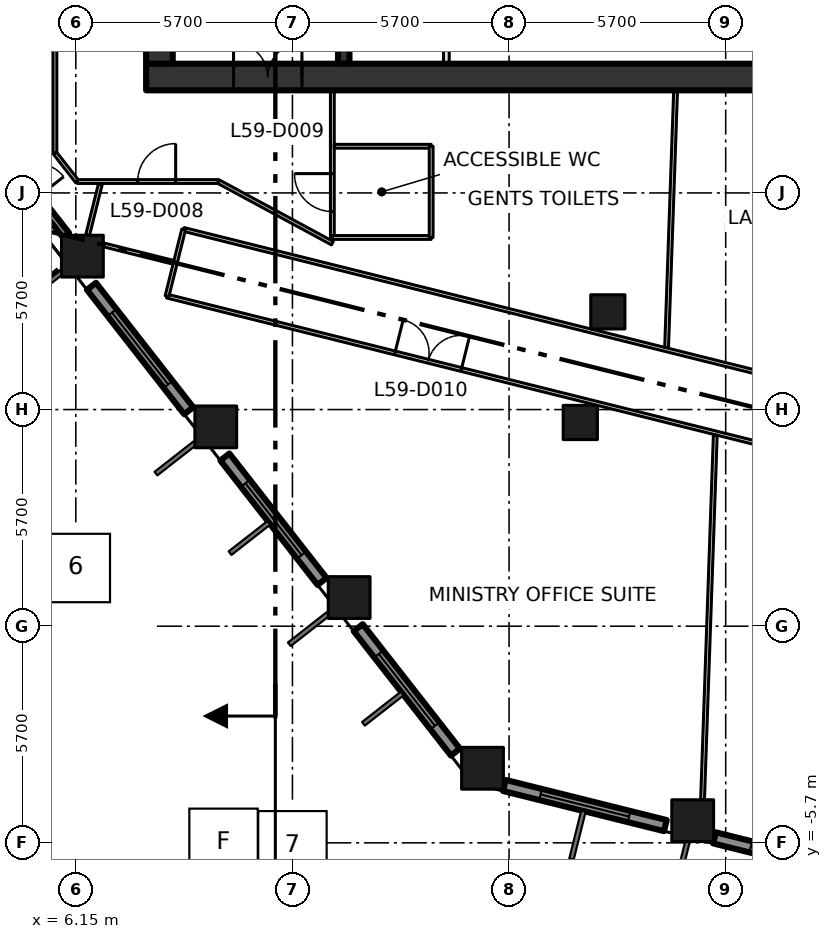
"""IFC4 building model, lengths in metres.
Left out: names, types, materials, properties, quantities, classifications, styles, units other than length and angle.
Written with IfcOpenShell. Run it as: python <this file> out.ifc"""

import sys

from ifc_helpers import new_model, si_unit, direction, frame, frame_2d, origin, origin_2d, place, context, subcontext, project, spatial, rectangle, extrude, element, fill, save


model = new_model("IFC4")
c1 = context("Model", 3, precision=1e-05, world=origin(), true_north=direction((0.0, 1.0)))
c2 = subcontext(c1, "Body", "Model", "MODEL_VIEW")
j1 = project(units=[si_unit("LENGTHUNIT", "METRE"), si_unit("PLANEANGLEUNIT", "RADIAN")], contexts=[c1])
p1 = place(None, origin())
s1 = spatial("IfcSite", under=j1, at=p1, CompositionType="ELEMENT")
p2 = place(p1, origin())
s2 = spatial("IfcBuilding", under=s1, at=p2, CompositionType="ELEMENT")
p3 = place(p2, frame((0.0, 0.0, 259.2)))
s3 = spatial("IfcBuildingStorey", under=s2, at=p3, CompositionType="ELEMENT", Elevation=259.2)
for number, where, z_axis, x_axis in (
    (1, (16.851, -3.738, 0.0), (0.0, 0.0, 1.0), (1.0, 0.0, 0.0)),
    (2, (13.342, 0.754, 0.0), (0.0, 0.0, 1.0), (1.0, 0.0, 0.0)),
    (3, (9.833, 5.245, 0.0), (0.0, 0.0, 1.0), (1.0, 0.0, 0.0)),
    (4, (6.323, 9.737, 0.0), (0.0, 0.0, 1.0), (1.0, 0.0, 0.0)),
    (5, (22.382, -5.117, 0.0), (0.0, 0.0, 1.0), (1.0, 0.0, 0.0)),
):
    element("IfcColumn", number, at=place(p3, frame(where, z_axis=z_axis, x_axis=x_axis)), inside=s3, PredefinedType="COLUMN", context=c2, shape_type="SweptSolid", body=[
        extrude(rectangle(XDim=1.1, YDim=1.1, at=origin_2d()), origin(), (0.0, 0.0, 1.0), 4.2),
    ])
for number, where, z_axis, x_axis in (
    (6, (19.424, 5.36, 0.0), (0.0, 0.0, 1.0), (1.0, 0.0, 0.0)),
    (7, (20.149, 8.271, 0.0), (0.0, 0.0, 1.0), (1.0, 0.0, 0.0)),
):
    element("IfcColumn", number, at=place(p3, frame(where, z_axis=z_axis, x_axis=x_axis)), inside=s3, PredefinedType="COLUMN", context=c2, shape_type="SweptSolid", body=[
        extrude(rectangle(XDim=0.9, YDim=0.9, at=origin_2d()), origin(), (0.0, 0.0, 1.0), 4.2),
    ])
p4 = place(p3, frame((8.0, 14.45, -0.3), z_axis=(0.0, 0.0, 1.0), x_axis=(1.0, 0.0, 0.0)))
e8 = element("IfcWall", 8, at=p4, inside=s3, PredefinedType="SHEAR", context=c2, shape_type="SweptSolid", body=[
    extrude(rectangle(XDim=22.8, YDim=0.7, at=frame_2d((11.4, 0.0))), origin(), (0.0, 0.0, 1.0), 4.2),
])
p5 = place(p4, frame((2.3, 0.0, 0.3)))
e9 = element("IfcOpeningElement", 9, at=p5, cuts=e8, PredefinedType="OPENING", context=c2, shape_type="SweptSolid", body=[
    extrude(rectangle(XDim=1.8, YDim=2.1, at=frame_2d((0.9, 1.05))), frame((0.0, 0.36, 0.0), z_axis=(0.0, -1.0, 0.0), x_axis=(1.0, 0.0, 0.0)), (0.0, 0.0, 1.0), 0.72),
])
p6 = place(p3, frame((8.35, 14.8, -0.3), z_axis=(0.0, 0.0, 1.0), x_axis=(0.0, 1.0, 0.0)))
e10 = element("IfcWall", 10, at=p6, inside=s3, PredefinedType="SHEAR", context=c2, shape_type="SweptSolid", body=[
    extrude(rectangle(XDim=20.9, YDim=0.7, at=frame_2d((10.45, 0.0))), origin(), (0.0, 0.0, 1.0), 4.2),
])
p7 = place(p3, frame((13.2, 14.8, 0.0), z_axis=(0.0, 0.0, 1.0), x_axis=(0.0, 1.0, 0.0)))
e11 = element("IfcWall", 11, at=p7, inside=s3, PredefinedType="SHEAR", context=c2, shape_type="SweptSolid", body=[
    extrude(rectangle(XDim=20.9, YDim=0.3, at=frame_2d((10.45, 0.0))), origin(), (0.0, 0.0, 1.0), 3.9),
])
p8 = place(p7, frame((3.5, 0.0, 0.0)))
e12 = element("IfcOpeningElement", 12, at=p8, cuts=e11, PredefinedType="OPENING", context=c2, shape_type="SweptSolid", body=[
    extrude(rectangle(XDim=1.8, YDim=2.1, at=frame_2d((0.9, 1.05))), frame((0.0, 0.16, 0.0), z_axis=(0.0, -1.0, 0.0), x_axis=(1.0, 0.0, 0.0)), (0.0, 0.0, 1.0), 0.32),
])
p9 = place(p7, frame((11.6, 0.0, 0.0)))
e13 = element("IfcOpeningElement", 13, at=p9, cuts=e11, PredefinedType="OPENING", context=c2, shape_type="SweptSolid", body=[
    extrude(rectangle(XDim=1.2, YDim=2.1, at=frame_2d((0.6, 1.05))), frame((0.0, 0.16, 0.0), z_axis=(0.0, -1.0, 0.0), x_axis=(1.0, 0.0, 0.0)), (0.0, 0.0, 1.0), 0.32),
])
p10 = place(p3, frame((15.9, 14.8, 0.0), z_axis=(0.0, 0.0, 1.0), x_axis=(0.0, 1.0, 0.0)))
e14 = element("IfcWall", 14, at=p10, inside=s3, PredefinedType="PARTITIONING", context=c2, shape_type="SweptSolid", body=[
    extrude(rectangle(XDim=2.825, YDim=0.15, at=frame_2d((1.413, 0.0))), origin(), (0.0, 0.0, 1.0), 3.9),
])
p11 = place(p3, frame((3.244, 13.679, 0.0), z_axis=(0.0, 0.0, 1.0), x_axis=(0.615682564618, -0.787994276392, 0.0)))
e15 = element("IfcWall", 15, at=p11, inside=s3, PredefinedType="SOLIDWALL", context=c2, shape_type="SweptSolid", body=[
    extrude(rectangle(XDim=4.304, YDim=0.2, at=frame_2d((2.152, 0.0))), origin(), (0.0, 0.0, 1.0), 3.15),
])
p12 = place(p11, frame((1.252, 0.0, 0.0)))
e16 = element("IfcOpeningElement", 16, at=p12, cuts=e15, PredefinedType="OPENING", context=c2, shape_type="SweptSolid", body=[
    extrude(rectangle(XDim=1.8, YDim=2.9, at=frame_2d((0.9, 1.45))), frame((0.0, 0.11, 0.0), z_axis=(0.0, -1.0, 0.0), x_axis=(1.0, 0.0, 0.0)), (0.0, 0.0, 1.0), 0.22),
])
p13 = place(p3, frame((6.562, 8.944, 0.0), z_axis=(0.0, 0.0, 1.0), x_axis=(0.615699893917, -0.787980736205, 0.0)))
e17 = element("IfcWall", 17, at=p13, inside=s3, PredefinedType="SOLIDWALL", context=c2, shape_type="SweptSolid", body=[
    extrude(rectangle(XDim=4.156, YDim=0.3, at=frame_2d((2.078, 0.0))), origin(), (0.0, 0.0, 1.0), 3.15),
])
p14 = place(p13, frame((0.878, 0.0, 0.8)))
e18 = element("IfcOpeningElement", 18, at=p14, cuts=e17, PredefinedType="OPENING", context=c2, shape_type="SweptSolid", body=[
    extrude(rectangle(XDim=2.4, YDim=2.1, at=frame_2d((1.2, 1.05))), frame((0.0, 0.16, 0.0), z_axis=(0.0, -1.0, 0.0), x_axis=(1.0, 0.0, 0.0)), (0.0, 0.0, 1.0), 0.32),
])
p15 = place(p3, frame((10.072, 4.452, 0.0), z_axis=(0.0, 0.0, 1.0), x_axis=(0.615660006568, -0.788011901124, 0.0)))
e19 = element("IfcWall", 19, at=p15, inside=s3, PredefinedType="SOLIDWALL", context=c2, shape_type="SweptSolid", body=[
    extrude(rectangle(XDim=4.155, YDim=0.3, at=frame_2d((2.077, 0.0))), origin(), (0.0, 0.0, 1.0), 3.15),
])
p16 = place(p15, frame((0.878, 0.0, 0.8)))
e20 = element("IfcOpeningElement", 20, at=p16, cuts=e19, PredefinedType="OPENING", context=c2, shape_type="SweptSolid", body=[
    extrude(rectangle(XDim=2.4, YDim=2.1, at=frame_2d((1.2, 1.05))), frame((0.0, 0.16, 0.0), z_axis=(0.0, -1.0, 0.0), x_axis=(1.0, 0.0, 0.0)), (0.0, 0.0, 1.0), 0.32),
])
p17 = place(p3, frame((13.581, -0.039, 0.0), z_axis=(0.0, 0.0, 1.0), x_axis=(0.615545986363, -0.788100969846, 0.0)))
e21 = element("IfcWall", 21, at=p17, inside=s3, PredefinedType="SOLIDWALL", context=c2, shape_type="SweptSolid", body=[
    extrude(rectangle(XDim=4.156, YDim=0.3, at=frame_2d((2.078, 0.0))), origin(), (0.0, 0.0, 1.0), 3.15),
])
p18 = place(p17, frame((0.878, 0.0, 0.8)))
e22 = element("IfcOpeningElement", 22, at=p18, cuts=e21, PredefinedType="OPENING", context=c2, shape_type="SweptSolid", body=[
    extrude(rectangle(XDim=2.4, YDim=2.1, at=frame_2d((1.2, 1.05))), frame((0.0, 0.16, 0.0), z_axis=(0.0, -1.0, 0.0), x_axis=(1.0, 0.0, 0.0)), (0.0, 0.0, 1.0), 0.32),
])
p19 = place(p3, frame((17.425, -4.19, 0.0), z_axis=(0.0, 0.0, 1.0), x_axis=(0.970270592847, -0.242022677978, 0.0)))
e23 = element("IfcWall", 23, at=p19, inside=s3, PredefinedType="SOLIDWALL", context=c2, shape_type="SweptSolid", body=[
    extrude(rectangle(XDim=4.368, YDim=0.3, at=frame_2d((2.184, 0.0))), origin(), (0.0, 0.0, 1.0), 3.15),
])
p20 = place(p19, frame((0.983, 0.0, 0.8)))
e24 = element("IfcOpeningElement", 24, at=p20, cuts=e23, PredefinedType="OPENING", context=c2, shape_type="SweptSolid", body=[
    extrude(rectangle(XDim=2.4, YDim=2.1, at=frame_2d((1.2, 1.05))), frame((0.0, 0.16, 0.0), z_axis=(0.0, -1.0, 0.0), x_axis=(1.0, 0.0, 0.0)), (0.0, 0.0, 1.0), 0.32),
])
p21 = place(p3, frame((22.956, -5.569, 0.0), z_axis=(0.0, 0.0, 1.0), x_axis=(0.970323116569, -0.241812012628, 0.0)))
e25 = element("IfcWall", 25, at=p21, inside=s3, PredefinedType="SOLIDWALL", context=c2, shape_type="SweptSolid", body=[
    extrude(rectangle(XDim=4.367, YDim=0.3, at=frame_2d((2.183, 0.0))), origin(), (0.0, 0.0, 1.0), 3.15),
])
p22 = place(p21, frame((0.983, 0.0, 0.8)))
e26 = element("IfcOpeningElement", 26, at=p22, cuts=e25, PredefinedType="OPENING", context=c2, shape_type="SweptSolid", body=[
    extrude(rectangle(XDim=2.4, YDim=2.1, at=frame_2d((1.2, 1.05))), frame((0.0, 0.16, 0.0), z_axis=(0.0, -1.0, 0.0), x_axis=(1.0, 0.0, 0.0)), (0.0, 0.0, 1.0), 0.32),
])
p23 = place(p3, frame((5.6, 12.45, 0.0), z_axis=(0.0, 0.0, 1.0), x_axis=(0.615644041972, -0.788024373725, 0.0)))
e27 = element("IfcWall", 27, at=p23, inside=s3, PredefinedType="PARTITIONING", context=c2, shape_type="SweptSolid", body=[
    extrude(rectangle(XDim=0.952, YDim=0.1, at=frame_2d((0.476, 0.0))), origin(), (0.0, 0.0, 1.0), 3.9),
])
p24 = place(p3, frame((5.6, 39.205, 0.0), z_axis=(0.0, 0.0, 1.0), x_axis=(0.0, -1.0, 0.0)))
e28 = element("IfcWall", 28, at=p24, inside=s3, PredefinedType="PARTITIONING", context=c2, shape_type="SweptSolid", body=[
    extrude(rectangle(XDim=26.755, YDim=0.1, at=frame_2d((13.377, 0.0))), origin(), (0.0, 0.0, 1.0), 3.9),
])
p25 = place(p24, frame((18.667, 0.0, 0.0)))
e29 = element("IfcOpeningElement", 29, at=p25, cuts=e28, PredefinedType="OPENING", context=c2, shape_type="SweptSolid", body=[
    extrude(rectangle(XDim=1.0, YDim=2.1, at=frame_2d((0.5, 1.05))), frame((0.0, 0.06, 0.0), z_axis=(0.0, -1.0, 0.0), x_axis=(1.0, 0.0, 0.0)), (0.0, 0.0, 1.0), 0.12),
])
p26 = place(p24, frame((5.08, 0.0, 0.0)))
e30 = element("IfcOpeningElement", 30, at=p26, cuts=e28, PredefinedType="OPENING", context=c2, shape_type="SweptSolid", body=[
    extrude(rectangle(XDim=1.0, YDim=2.1, at=frame_2d((0.5, 1.05))), frame((0.0, 0.06, 0.0), z_axis=(0.0, -1.0, 0.0), x_axis=(1.0, 0.0, 0.0)), (0.0, 0.0, 1.0), 0.12),
])
p27 = place(p3, frame((6.186, 11.7, 0.0), z_axis=(0.0, 0.0, 1.0), x_axis=(1.0, 0.0, 0.0)))
e31 = element("IfcWall", 31, at=p27, inside=s3, PredefinedType="PARTITIONING", context=c2, shape_type="SweptSolid", body=[
    extrude(rectangle(XDim=3.714, YDim=0.1, at=frame_2d((1.857, 0.0))), origin(), (0.0, 0.0, 1.0), 3.9),
])
p28 = place(p27, frame((1.591, 0.0, 0.0)))
e32 = element("IfcOpeningElement", 32, at=p28, cuts=e31, PredefinedType="OPENING", context=c2, shape_type="SweptSolid", body=[
    extrude(rectangle(XDim=1.0, YDim=2.1, at=frame_2d((0.5, 1.05))), frame((0.0, 0.06, 0.0), z_axis=(0.0, -1.0, 0.0), x_axis=(1.0, 0.0, 0.0)), (0.0, 0.0, 1.0), 0.12),
])
p29 = place(p3, frame((8.55, 8.685, 0.0), z_axis=(0.0, 0.0, 1.0), x_axis=(0.970298026101, -0.241912671319, 0.0)))
e33 = element("IfcWall", 33, at=p29, inside=s3, PredefinedType="PARTITIONING", context=c2, shape_type="SweptSolid", body=[
    extrude(rectangle(XDim=51.275, YDim=0.1, at=frame_2d((25.637, 0.0))), origin(), (0.0, 0.0, 1.0), 3.9),
])
p30 = place(p29, frame((19.45, 0.0, 0.0)))
e34 = element("IfcOpeningElement", 34, at=p30, cuts=e33, PredefinedType="OPENING", context=c2, shape_type="SweptSolid", body=[
    extrude(rectangle(XDim=1.8, YDim=2.1, at=frame_2d((0.9, 1.05))), frame((0.0, 0.06, 0.0), z_axis=(0.0, -1.0, 0.0), x_axis=(1.0, 0.0, 0.0)), (0.0, 0.0, 1.0), 0.12),
])
p31 = place(p29, frame((31.35, 0.0, 0.0)))
e35 = element("IfcOpeningElement", 35, at=p31, cuts=e33, PredefinedType="OPENING", context=c2, shape_type="SweptSolid", body=[
    extrude(rectangle(XDim=1.8, YDim=2.1, at=frame_2d((0.9, 1.05))), frame((0.0, 0.06, 0.0), z_axis=(0.0, -1.0, 0.0), x_axis=(1.0, 0.0, 0.0)), (0.0, 0.0, 1.0), 0.12),
])
p32 = place(p29, frame((6.18, 0.0, 0.0)))
e36 = element("IfcOpeningElement", 36, at=p32, cuts=e33, PredefinedType="OPENING", context=c2, shape_type="SweptSolid", body=[
    extrude(rectangle(XDim=1.8, YDim=2.1, at=frame_2d((0.9, 1.05))), frame((0.0, 0.06, 0.0), z_axis=(0.0, -1.0, 0.0), x_axis=(1.0, 0.0, 0.0)), (0.0, 0.0, 1.0), 0.12),
])
p33 = place(p3, frame((8.988, 10.44, 0.0), z_axis=(0.0, 0.0, 1.0), x_axis=(0.970301223092, -0.241899848006, 0.0)))
e37 = element("IfcWall", 37, at=p33, inside=s3, PredefinedType="PARTITIONING", context=c2, shape_type="SweptSolid", body=[
    extrude(rectangle(XDim=19.879, YDim=0.1, at=frame_2d((9.94, 0.0))), origin(), (0.0, 0.0, 1.0), 3.9),
])
p34 = place(p3, frame((8.988, 10.44, 0.0), z_axis=(0.0, 0.0, 1.0), x_axis=(-0.242154485745, -0.970237705428, 0.0)))
e38 = element("IfcWall", 38, at=p34, inside=s3, PredefinedType="PARTITIONING", context=c2, shape_type="SweptSolid", body=[
    extrude(rectangle(XDim=1.809, YDim=0.1, at=frame_2d((0.904, 0.0))), origin(), (0.0, 0.0, 1.0), 3.9),
])
p35 = place(p3, frame((9.9, 11.7, 0.0), z_axis=(0.0, 0.0, 1.0), x_axis=(0.87965147249, -0.475618846291, 0.0)))
e39 = element("IfcWall", 39, at=p35, inside=s3, PredefinedType="PARTITIONING", context=c2, shape_type="SweptSolid", body=[
    extrude(rectangle(XDim=3.41, YDim=0.1, at=frame_2d((1.705, 0.0))), origin(), (0.0, 0.0, 1.0), 3.9),
])
p36 = place(p3, frame((12.9, 10.228, 0.0), z_axis=(0.0, 0.0, 1.0), x_axis=(0.0, 1.0, 0.0)))
e40 = element("IfcWall", 40, at=p36, inside=s3, PredefinedType="PARTITIONING", context=c2, shape_type="SweptSolid", body=[
    extrude(rectangle(XDim=3.872, YDim=0.1, at=frame_2d((1.936, 0.0))), origin(), (0.0, 0.0, 1.0), 3.9),
])
p37 = place(p36, frame((0.68, 0.0, 0.0)))
e41 = element("IfcOpeningElement", 41, at=p37, cuts=e40, PredefinedType="OPENING", context=c2, shape_type="SweptSolid", body=[
    extrude(rectangle(XDim=1.0, YDim=2.1, at=frame_2d((0.5, 1.05))), frame((0.0, 0.06, 0.0), z_axis=(0.0, -1.0, 0.0), x_axis=(1.0, 0.0, 0.0)), (0.0, 0.0, 1.0), 0.12),
])
p38 = place(p3, frame((6.797, 11.638, 0.0), z_axis=(0.0, 0.0, 1.0), x_axis=(-0.242164268782, -0.970235263699, 0.0)))
e42 = element("IfcWall", 42, at=p38, inside=s3, PredefinedType="PARTITIONING", context=c2, shape_type="SweptSolid", body=[
    extrude(rectangle(XDim=1.392, YDim=0.1, at=frame_2d((0.696, 0.0))), origin(), (0.0, 0.0, 1.0), 3.9),
])
p39 = place(p3, frame((8.72, 9.574, 0.0), z_axis=(0.0, 0.0, 1.0), x_axis=(-0.970240497311, 0.242143299263, 0.0)))
e43 = element("IfcWall", 43, at=p39, inside=s3, PredefinedType="PARTITIONING", context=c2, shape_type="SweptSolid", body=[
    extrude(rectangle(XDim=1.904, YDim=0.1, at=frame_2d((0.952, 0.0))), origin(), (0.0, 0.0, 1.0), 3.9),
])
p40 = place(p3, frame((12.95, 12.628, 0.0), z_axis=(0.0, 0.0, 1.0), x_axis=(1.0, 0.0, 0.0)))
e44 = element("IfcWall", 44, at=p40, inside=s3, PredefinedType="PARTITIONING", context=c2, shape_type="SweptSolid", body=[
    extrude(rectangle(XDim=2.55, YDim=0.1, at=frame_2d((1.275, 0.0))), origin(), (0.0, 0.0, 1.0), 3.9),
])
p41 = place(p3, frame((15.5, 10.228, 0.0), z_axis=(0.0, 0.0, 1.0), x_axis=(-1.0, 0.0, 0.0)))
e45 = element("IfcWall", 45, at=p41, inside=s3, PredefinedType="PARTITIONING", context=c2, shape_type="SweptSolid", body=[
    extrude(rectangle(XDim=2.6, YDim=0.1, at=frame_2d((1.3, 0.0))), origin(), (0.0, 0.0, 1.0), 3.9),
])
p42 = place(p3, frame((15.5, 12.628, 0.0), z_axis=(0.0, 0.0, 1.0), x_axis=(0.0, -1.0, 0.0)))
e46 = element("IfcWall", 46, at=p42, inside=s3, PredefinedType="PARTITIONING", context=c2, shape_type="SweptSolid", body=[
    extrude(rectangle(XDim=2.4, YDim=0.1, at=frame_2d((1.2, 0.0))), origin(), (0.0, 0.0, 1.0), 3.9),
])
p43 = place(p3, frame((21.695, 7.334, 0.0), z_axis=(0.0, 0.0, 1.0), x_axis=(0.034978942342, 0.999388049555, 0.0)))
e47 = element("IfcWall", 47, at=p43, inside=s3, PredefinedType="PARTITIONING", context=c2, shape_type="SweptSolid", body=[
    extrude(rectangle(XDim=6.77, YDim=0.1, at=frame_2d((3.385, 0.0))), origin(), (0.0, 0.0, 1.0), 3.9),
])
p44 = place(p3, frame((22.641, -4.567, 0.0), z_axis=(0.0, 0.0, 1.0), x_axis=(0.034896781654, 0.999390921827, 0.0)))
e48 = element("IfcWall", 48, at=p44, inside=s3, PredefinedType="PARTITIONING", context=c2, shape_type="SweptSolid", body=[
    extrude(rectangle(XDim=9.599, YDim=0.1, at=frame_2d((4.799, 0.0))), origin(), (0.0, 0.0, 1.0), 3.9),
])
p45 = place(p5, origin())
e49 = element("IfcDoor", 49, at=p45, inside=s3, OperationType="DOUBLE_DOOR_SINGLE_SWING", PredefinedType="DOOR", context=c2, shape_type="SweptSolid", body=[
    extrude(rectangle(XDim=1.8, YDim=2.1, at=frame_2d((0.9, 1.05))), frame((0.0, 0.025, 0.0), z_axis=(0.0, -1.0, 0.0), x_axis=(1.0, 0.0, 0.0)), (0.0, 0.0, 1.0), 0.05),
])
fill(e9, e49)
p46 = place(p14, origin())
e50 = element("IfcWindow", 50, at=p46, inside=s3, PartitioningType="DOUBLE_PANEL_VERTICAL", PredefinedType="WINDOW", context=c2, shape_type="SweptSolid", body=[
    extrude(rectangle(XDim=2.4, YDim=2.1, at=frame_2d((1.2, 1.05))), frame((0.0, 0.03, 0.0), z_axis=(0.0, -1.0, 0.0), x_axis=(1.0, 0.0, 0.0)), (0.0, 0.0, 1.0), 0.06),
])
fill(e18, e50)
p47 = place(p16, origin())
e51 = element("IfcWindow", 51, at=p47, inside=s3, PartitioningType="DOUBLE_PANEL_VERTICAL", PredefinedType="WINDOW", context=c2, shape_type="SweptSolid", body=[
    extrude(rectangle(XDim=2.4, YDim=2.1, at=frame_2d((1.2, 1.05))), frame((0.0, 0.03, 0.0), z_axis=(0.0, -1.0, 0.0), x_axis=(1.0, 0.0, 0.0)), (0.0, 0.0, 1.0), 0.06),
])
fill(e20, e51)
p48 = place(p18, origin())
e52 = element("IfcWindow", 52, at=p48, inside=s3, PartitioningType="DOUBLE_PANEL_VERTICAL", PredefinedType="WINDOW", context=c2, shape_type="SweptSolid", body=[
    extrude(rectangle(XDim=2.4, YDim=2.1, at=frame_2d((1.2, 1.05))), frame((0.0, 0.03, 0.0), z_axis=(0.0, -1.0, 0.0), x_axis=(1.0, 0.0, 0.0)), (0.0, 0.0, 1.0), 0.06),
])
fill(e22, e52)
p49 = place(p20, origin())
e53 = element("IfcWindow", 53, at=p49, inside=s3, PartitioningType="DOUBLE_PANEL_VERTICAL", PredefinedType="WINDOW", context=c2, shape_type="SweptSolid", body=[
    extrude(rectangle(XDim=2.4, YDim=2.1, at=frame_2d((1.2, 1.05))), frame((0.0, 0.03, 0.0), z_axis=(0.0, -1.0, 0.0), x_axis=(1.0, 0.0, 0.0)), (0.0, 0.0, 1.0), 0.06),
])
fill(e24, e53)
p50 = place(p22, origin())
e54 = element("IfcWindow", 54, at=p50, inside=s3, PartitioningType="DOUBLE_PANEL_VERTICAL", PredefinedType="WINDOW", context=c2, shape_type="SweptSolid", body=[
    extrude(rectangle(XDim=2.4, YDim=2.1, at=frame_2d((1.2, 1.05))), frame((0.0, 0.03, 0.0), z_axis=(0.0, -1.0, 0.0), x_axis=(1.0, 0.0, 0.0)), (0.0, 0.0, 1.0), 0.06),
])
fill(e26, e54)
p51 = place(p28, origin())
e55 = element("IfcDoor", 55, at=p51, inside=s3, OperationType="SINGLE_SWING_RIGHT", PredefinedType="DOOR", context=c2, shape_type="SweptSolid", body=[
    extrude(rectangle(XDim=1.0, YDim=2.1, at=frame_2d((0.5, 1.05))), frame((0.0, 0.025, 0.0), z_axis=(0.0, -1.0, 0.0), x_axis=(1.0, 0.0, 0.0)), (0.0, 0.0, 1.0), 0.05),
])
fill(e32, e55)
p52 = place(p37, origin())
e56 = element("IfcDoor", 56, at=p52, inside=s3, OperationType="SINGLE_SWING_RIGHT", PredefinedType="DOOR", context=c2, shape_type="SweptSolid", body=[
    extrude(rectangle(XDim=1.0, YDim=2.1, at=frame_2d((0.5, 1.05))), frame((0.0, 0.025, 0.0), z_axis=(0.0, -1.0, 0.0), x_axis=(1.0, 0.0, 0.0)), (0.0, 0.0, 1.0), 0.05),
])
fill(e41, e56)
p53 = place(p32, origin())
e57 = element("IfcDoor", 57, at=p53, inside=s3, OperationType="DOUBLE_DOOR_SINGLE_SWING", PredefinedType="DOOR", context=c2, shape_type="SweptSolid", body=[
    extrude(rectangle(XDim=1.8, YDim=2.1, at=frame_2d((0.9, 1.05))), frame((0.0, 0.025, 0.0), z_axis=(0.0, -1.0, 0.0), x_axis=(1.0, 0.0, 0.0)), (0.0, 0.0, 1.0), 0.05),
])
fill(e36, e57)
save(model, sys.argv[1])
